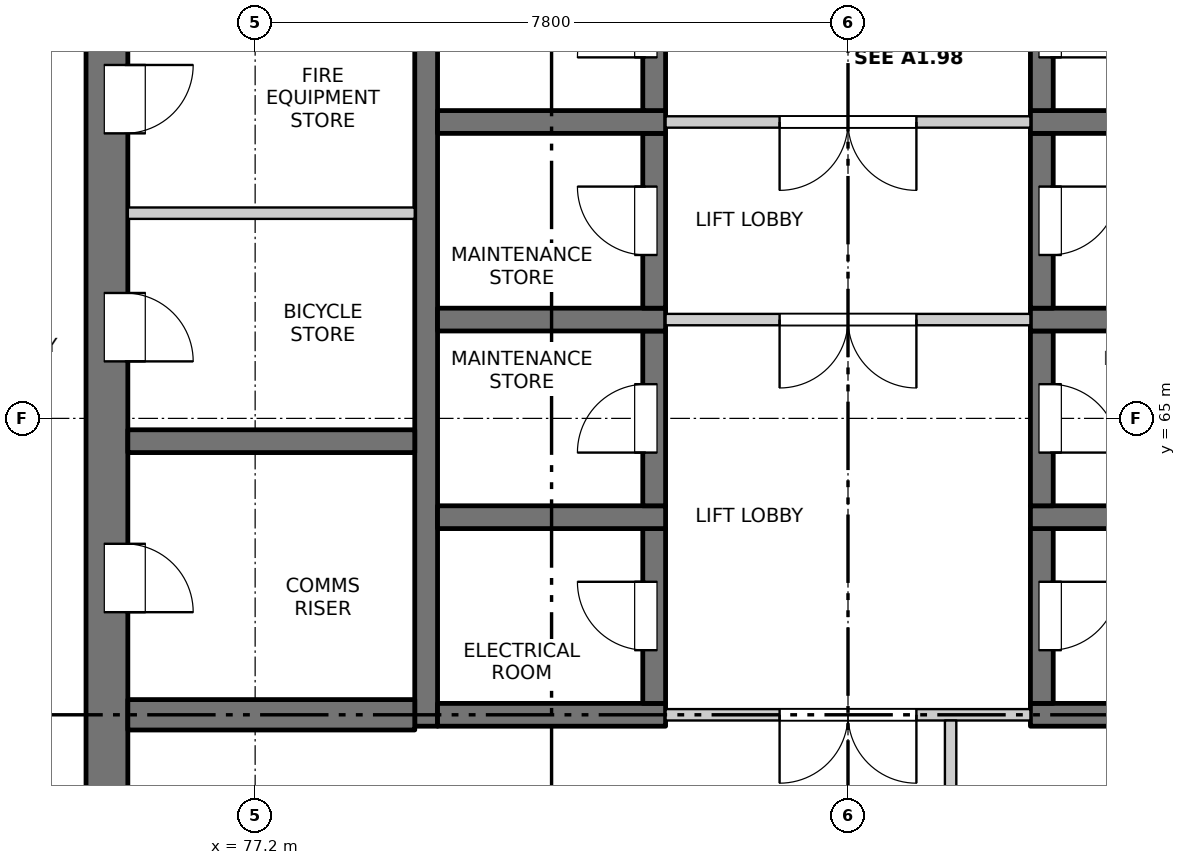
"""IFC4 building model, lengths in metres.
Left out: names, types, materials, properties, quantities, classifications, styles, units other than length and angle.
Written with IfcOpenShell. Run it as: python <this file> out.ifc"""

import sys

from ifc_helpers import new_model, si_unit, direction, frame, frame_2d, origin, place, context, subcontext, project, spatial, rectangle, extrude, element, fill, save


model = new_model("IFC4")
c1 = context("Model", 3, precision=1e-05, world=origin(), true_north=direction((0.0, 1.0)))
c2 = subcontext(c1, "Body", "Model", "MODEL_VIEW")
j1 = project(units=[si_unit("LENGTHUNIT", "METRE"), si_unit("PLANEANGLEUNIT", "RADIAN")], contexts=[c1])
p1 = place(None, origin())
s1 = spatial("IfcSite", under=j1, at=p1, CompositionType="ELEMENT")
p2 = place(p1, origin())
s2 = spatial("IfcBuilding", under=s1, at=p2, CompositionType="ELEMENT")
p3 = place(p2, frame((0.0, 0.0, 189.4)))
s3 = spatial("IfcBuildingStorey", under=s2, at=p3, CompositionType="ELEMENT", Elevation=189.4)
p4 = place(p3, frame((75.25, 54.975, -0.25), z_axis=(0.0, 0.0, 1.0), x_axis=(0.0, 1.0, 0.0)))
e1 = element("IfcWall", 1, at=p4, inside=s3, PredefinedType="SOLIDWALL", context=c2, shape_type="SweptSolid", body=[
    extrude(rectangle(XDim=22.325, YDim=0.55, at=frame_2d((11.163, 0.0))), origin(), (0.0, 0.0, 1.0), 3.35),
])
p5 = place(p4, frame((7.475, 0.0, 0.25)))
e2 = element("IfcOpeningElement", 2, at=p5, cuts=e1, PredefinedType="OPENING", context=c2, shape_type="SweptSolid", body=[
    extrude(rectangle(XDim=0.9, YDim=2.1, at=frame_2d((0.45, 1.05))), frame((0.0, 0.285, 0.0), z_axis=(0.0, -1.0, 0.0), x_axis=(1.0, 0.0, 0.0)), (0.0, 0.0, 1.0), 0.57),
])
p6 = place(p4, frame((10.775, 0.0, 0.25)))
e3 = element("IfcOpeningElement", 3, at=p6, cuts=e1, PredefinedType="OPENING", context=c2, shape_type="SweptSolid", body=[
    extrude(rectangle(XDim=0.9, YDim=2.1, at=frame_2d((0.45, 1.05))), frame((0.0, 0.285, 0.0), z_axis=(0.0, -1.0, 0.0), x_axis=(1.0, 0.0, 0.0)), (0.0, 0.0, 1.0), 0.57),
])
p7 = place(p4, frame((13.775, 0.0, 0.25)))
e4 = element("IfcOpeningElement", 4, at=p7, cuts=e1, PredefinedType="OPENING", context=c2, shape_type="SweptSolid", body=[
    extrude(rectangle(XDim=0.9, YDim=2.1, at=frame_2d((0.45, 1.05))), frame((0.0, 0.285, 0.0), z_axis=(0.0, -1.0, 0.0), x_axis=(1.0, 0.0, 0.0)), (0.0, 0.0, 1.0), 0.57),
])
p8 = place(p4, frame((16.775, 0.0, 0.25)))
e5 = element("IfcOpeningElement", 5, at=p8, cuts=e1, PredefinedType="OPENING", context=c2, shape_type="SweptSolid", body=[
    extrude(rectangle(XDim=0.9, YDim=2.1, at=frame_2d((0.45, 1.05))), frame((0.0, 0.285, 0.0), z_axis=(0.0, -1.0, 0.0), x_axis=(1.0, 0.0, 0.0)), (0.0, 0.0, 1.0), 0.57),
])
p9 = place(p4, frame((20.075, 0.0, 0.25)))
e6 = element("IfcOpeningElement", 6, at=p9, cuts=e1, PredefinedType="OPENING", context=c2, shape_type="SweptSolid", body=[
    extrude(rectangle(XDim=0.9, YDim=2.1, at=frame_2d((0.45, 1.05))), frame((0.0, 0.285, 0.0), z_axis=(0.0, -1.0, 0.0), x_axis=(1.0, 0.0, 0.0)), (0.0, 0.0, 1.0), 0.57),
])
p10 = place(p3, frame((79.45, 60.95, -0.25), z_axis=(0.0, 0.0, 1.0), x_axis=(0.0, 1.0, 0.0)))
e7 = element("IfcWall", 7, at=p10, inside=s3, PredefinedType="SOLIDWALL", context=c2, shape_type="SweptSolid", body=[
    extrude(rectangle(XDim=16.35, YDim=0.3, at=frame_2d((8.175, 0.0))), origin(), (0.0, 0.0, 1.0), 3.35),
])
p11 = place(p3, frame((79.6, 61.1, -0.25), z_axis=(0.0, 0.0, 1.0), x_axis=(1.0, 0.0, 0.0)))
e8 = element("IfcWall", 8, at=p11, inside=s3, PredefinedType="SOLIDWALL", context=c2, shape_type="SweptSolid", body=[
    extrude(rectangle(XDim=3.0, YDim=0.3, at=frame_2d((1.5, 0.0))), origin(), (0.0, 0.0, 1.0), 3.35),
])
p12 = place(p3, frame((82.45, 61.25, -0.25), z_axis=(0.0, 0.0, 1.0), x_axis=(0.0, 1.0, 0.0)))
e9 = element("IfcWall", 9, at=p12, inside=s3, PredefinedType="SOLIDWALL", context=c2, shape_type="SweptSolid", body=[
    extrude(rectangle(XDim=2.3, YDim=0.3, at=frame_2d((1.15, 0.0))), origin(), (0.0, 0.0, 1.0), 3.35),
])
p13 = place(p12, frame((0.7, 0.0, 0.25)))
e10 = element("IfcOpeningElement", 10, at=p13, cuts=e9, PredefinedType="OPENING", context=c2, shape_type="SweptSolid", body=[
    extrude(rectangle(XDim=0.9, YDim=2.1, at=frame_2d((0.45, 1.05))), frame((0.0, 0.16, 0.0), z_axis=(0.0, -1.0, 0.0), x_axis=(1.0, 0.0, 0.0)), (0.0, 0.0, 1.0), 0.32),
])
p14 = place(p3, frame((79.6, 63.7, -0.25), z_axis=(0.0, 0.0, 1.0), x_axis=(1.0, 0.0, 0.0)))
e11 = element("IfcWall", 11, at=p14, inside=s3, PredefinedType="SOLIDWALL", context=c2, shape_type="SweptSolid", body=[
    extrude(rectangle(XDim=3.0, YDim=0.3, at=frame_2d((1.5, 0.0))), origin(), (0.0, 0.0, 1.0), 3.35),
])
p15 = place(p3, frame((82.45, 63.85, -0.25), z_axis=(0.0, 0.0, 1.0), x_axis=(0.0, 1.0, 0.0)))
e12 = element("IfcWall", 12, at=p15, inside=s3, PredefinedType="SOLIDWALL", context=c2, shape_type="SweptSolid", body=[
    extrude(rectangle(XDim=2.3, YDim=0.3, at=frame_2d((1.15, 0.0))), origin(), (0.0, 0.0, 1.0), 3.35),
])
p16 = place(p15, frame((0.7, 0.0, 0.25)))
e13 = element("IfcOpeningElement", 13, at=p16, cuts=e12, PredefinedType="OPENING", context=c2, shape_type="SweptSolid", body=[
    extrude(rectangle(XDim=0.9, YDim=2.1, at=frame_2d((0.45, 1.05))), frame((0.0, 0.16, 0.0), z_axis=(0.0, -1.0, 0.0), x_axis=(1.0, 0.0, 0.0)), (0.0, 0.0, 1.0), 0.32),
])
p17 = place(p3, frame((79.6, 66.3, -0.25), z_axis=(0.0, 0.0, 1.0), x_axis=(1.0, 0.0, 0.0)))
e14 = element("IfcWall", 14, at=p17, inside=s3, PredefinedType="SOLIDWALL", context=c2, shape_type="SweptSolid", body=[
    extrude(rectangle(XDim=3.0, YDim=0.3, at=frame_2d((1.5, 0.0))), origin(), (0.0, 0.0, 1.0), 3.35),
])
p18 = place(p3, frame((82.45, 66.45, -0.25), z_axis=(0.0, 0.0, 1.0), x_axis=(0.0, 1.0, 0.0)))
e15 = element("IfcWall", 15, at=p18, inside=s3, PredefinedType="SOLIDWALL", context=c2, shape_type="SweptSolid", body=[
    extrude(rectangle(XDim=2.3, YDim=0.3, at=frame_2d((1.15, 0.0))), origin(), (0.0, 0.0, 1.0), 3.35),
])
p19 = place(p18, frame((0.7, 0.0, 0.25)))
e16 = element("IfcOpeningElement", 16, at=p19, cuts=e15, PredefinedType="OPENING", context=c2, shape_type="SweptSolid", body=[
    extrude(rectangle(XDim=0.9, YDim=2.1, at=frame_2d((0.45, 1.05))), frame((0.0, 0.16, 0.0), z_axis=(0.0, -1.0, 0.0), x_axis=(1.0, 0.0, 0.0)), (0.0, 0.0, 1.0), 0.32),
])
p20 = place(p3, frame((79.6, 68.9, -0.25), z_axis=(0.0, 0.0, 1.0), x_axis=(1.0, 0.0, 0.0)))
e17 = element("IfcWall", 17, at=p20, inside=s3, PredefinedType="SOLIDWALL", context=c2, shape_type="SweptSolid", body=[
    extrude(rectangle(XDim=3.0, YDim=0.3, at=frame_2d((1.5, 0.0))), origin(), (0.0, 0.0, 1.0), 3.35),
])
p21 = place(p3, frame((82.45, 69.05, -0.25), z_axis=(0.0, 0.0, 1.0), x_axis=(0.0, 1.0, 0.0)))
e18 = element("IfcWall", 18, at=p21, inside=s3, PredefinedType="SOLIDWALL", context=c2, shape_type="SweptSolid", body=[
    extrude(rectangle(XDim=2.3, YDim=0.3, at=frame_2d((1.15, 0.0))), origin(), (0.0, 0.0, 1.0), 3.35),
])
p22 = place(p21, frame((0.7, 0.0, 0.25)))
e19 = element("IfcOpeningElement", 19, at=p22, cuts=e18, PredefinedType="OPENING", context=c2, shape_type="SweptSolid", body=[
    extrude(rectangle(XDim=0.9, YDim=2.1, at=frame_2d((0.45, 1.05))), frame((0.0, 0.16, 0.0), z_axis=(0.0, -1.0, 0.0), x_axis=(1.0, 0.0, 0.0)), (0.0, 0.0, 1.0), 0.32),
])
p23 = place(p3, frame((87.4, 61.1, -0.25), z_axis=(0.0, 0.0, 1.0), x_axis=(1.0, 0.0, 0.0)))
e20 = element("IfcWall", 20, at=p23, inside=s3, PredefinedType="SOLIDWALL", context=c2, shape_type="SweptSolid", body=[
    extrude(rectangle(XDim=3.0, YDim=0.3, at=frame_2d((1.5, 0.0))), origin(), (0.0, 0.0, 1.0), 3.35),
])
p24 = place(p3, frame((87.55, 61.25, -0.25), z_axis=(0.0, 0.0, 1.0), x_axis=(0.0, 1.0, 0.0)))
e21 = element("IfcWall", 21, at=p24, inside=s3, PredefinedType="SOLIDWALL", context=c2, shape_type="SweptSolid", body=[
    extrude(rectangle(XDim=2.3, YDim=0.3, at=frame_2d((1.15, 0.0))), origin(), (0.0, 0.0, 1.0), 3.35),
])
p25 = place(p24, frame((0.7, 0.0, 0.25)))
e22 = element("IfcOpeningElement", 22, at=p25, cuts=e21, PredefinedType="OPENING", context=c2, shape_type="SweptSolid", body=[
    extrude(rectangle(XDim=0.9, YDim=2.1, at=frame_2d((0.45, 1.05))), frame((0.0, 0.16, 0.0), z_axis=(0.0, -1.0, 0.0), x_axis=(1.0, 0.0, 0.0)), (0.0, 0.0, 1.0), 0.32),
])
p26 = place(p3, frame((87.4, 63.7, -0.25), z_axis=(0.0, 0.0, 1.0), x_axis=(1.0, 0.0, 0.0)))
e23 = element("IfcWall", 23, at=p26, inside=s3, PredefinedType="SOLIDWALL", context=c2, shape_type="SweptSolid", body=[
    extrude(rectangle(XDim=3.0, YDim=0.3, at=frame_2d((1.5, 0.0))), origin(), (0.0, 0.0, 1.0), 3.35),
])
p27 = place(p3, frame((87.55, 63.85, -0.25), z_axis=(0.0, 0.0, 1.0), x_axis=(0.0, 1.0, 0.0)))
e24 = element("IfcWall", 24, at=p27, inside=s3, PredefinedType="SOLIDWALL", context=c2, shape_type="SweptSolid", body=[
    extrude(rectangle(XDim=2.3, YDim=0.3, at=frame_2d((1.15, 0.0))), origin(), (0.0, 0.0, 1.0), 3.35),
])
p28 = place(p27, frame((0.7, 0.0, 0.25)))
e25 = element("IfcOpeningElement", 25, at=p28, cuts=e24, PredefinedType="OPENING", context=c2, shape_type="SweptSolid", body=[
    extrude(rectangle(XDim=0.9, YDim=2.1, at=frame_2d((0.45, 1.05))), frame((0.0, 0.16, 0.0), z_axis=(0.0, -1.0, 0.0), x_axis=(1.0, 0.0, 0.0)), (0.0, 0.0, 1.0), 0.32),
])
p29 = place(p3, frame((87.4, 66.3, -0.25), z_axis=(0.0, 0.0, 1.0), x_axis=(1.0, 0.0, 0.0)))
e26 = element("IfcWall", 26, at=p29, inside=s3, PredefinedType="SOLIDWALL", context=c2, shape_type="SweptSolid", body=[
    extrude(rectangle(XDim=3.0, YDim=0.3, at=frame_2d((1.5, 0.0))), origin(), (0.0, 0.0, 1.0), 3.35),
])
p30 = place(p3, frame((87.55, 66.45, -0.25), z_axis=(0.0, 0.0, 1.0), x_axis=(0.0, 1.0, 0.0)))
e27 = element("IfcWall", 27, at=p30, inside=s3, PredefinedType="SOLIDWALL", context=c2, shape_type="SweptSolid", body=[
    extrude(rectangle(XDim=2.3, YDim=0.3, at=frame_2d((1.15, 0.0))), origin(), (0.0, 0.0, 1.0), 3.35),
])
p31 = place(p30, frame((0.7, 0.0, 0.25)))
e28 = element("IfcOpeningElement", 28, at=p31, cuts=e27, PredefinedType="OPENING", context=c2, shape_type="SweptSolid", body=[
    extrude(rectangle(XDim=0.9, YDim=2.1, at=frame_2d((0.45, 1.05))), frame((0.0, 0.16, 0.0), z_axis=(0.0, -1.0, 0.0), x_axis=(1.0, 0.0, 0.0)), (0.0, 0.0, 1.0), 0.32),
])
p32 = place(p3, frame((87.4, 68.9, -0.25), z_axis=(0.0, 0.0, 1.0), x_axis=(1.0, 0.0, 0.0)))
e29 = element("IfcWall", 29, at=p32, inside=s3, PredefinedType="SOLIDWALL", context=c2, shape_type="SweptSolid", body=[
    extrude(rectangle(XDim=3.0, YDim=0.3, at=frame_2d((1.5, 0.0))), origin(), (0.0, 0.0, 1.0), 3.35),
])
p33 = place(p3, frame((87.55, 69.05, -0.25), z_axis=(0.0, 0.0, 1.0), x_axis=(0.0, 1.0, 0.0)))
e30 = element("IfcWall", 30, at=p33, inside=s3, PredefinedType="SOLIDWALL", context=c2, shape_type="SweptSolid", body=[
    extrude(rectangle(XDim=2.3, YDim=0.3, at=frame_2d((1.15, 0.0))), origin(), (0.0, 0.0, 1.0), 3.35),
])
p34 = place(p33, frame((0.7, 0.0, 0.25)))
e31 = element("IfcOpeningElement", 31, at=p34, cuts=e30, PredefinedType="OPENING", context=c2, shape_type="SweptSolid", body=[
    extrude(rectangle(XDim=0.9, YDim=2.1, at=frame_2d((0.45, 1.05))), frame((0.0, 0.16, 0.0), z_axis=(0.0, -1.0, 0.0), x_axis=(1.0, 0.0, 0.0)), (0.0, 0.0, 1.0), 0.32),
])
p35 = place(p3, frame((75.525, 61.1, -0.25), z_axis=(0.0, 0.0, 1.0), x_axis=(1.0, 0.0, 0.0)))
e32 = element("IfcWall", 32, at=p35, inside=s3, PredefinedType="SOLIDWALL", context=c2, shape_type="SweptSolid", body=[
    extrude(rectangle(XDim=3.775, YDim=0.4, at=frame_2d((1.888, 0.0))), origin(), (0.0, 0.0, 1.0), 3.35),
])
p36 = place(p3, frame((75.525, 64.7, -0.25), z_axis=(0.0, 0.0, 1.0), x_axis=(1.0, 0.0, 0.0)))
e33 = element("IfcWall", 33, at=p36, inside=s3, PredefinedType="SOLIDWALL", context=c2, shape_type="SweptSolid", body=[
    extrude(rectangle(XDim=3.775, YDim=0.3, at=frame_2d((1.888, 0.0))), origin(), (0.0, 0.0, 1.0), 3.35),
])
p37 = place(p3, frame((82.6, 61.1, 0.0), z_axis=(0.0, 0.0, 1.0), x_axis=(1.0, 0.0, 0.0)))
e34 = element("IfcWall", 34, at=p37, inside=s3, PredefinedType="PARTITIONING", context=c2, shape_type="SweptSolid", body=[
    extrude(rectangle(XDim=4.8, YDim=0.15, at=frame_2d((2.4, 0.0))), origin(), (0.0, 0.0, 1.0), 3.1),
])
p38 = place(p37, frame((1.5, 0.0, 0.0)))
e35 = element("IfcOpeningElement", 35, at=p38, cuts=e34, PredefinedType="OPENING", context=c2, shape_type="SweptSolid", body=[
    extrude(rectangle(XDim=1.8, YDim=2.1, at=frame_2d((0.9, 1.05))), frame((0.0, 0.085, 0.0), z_axis=(0.0, -1.0, 0.0), x_axis=(1.0, 0.0, 0.0)), (0.0, 0.0, 1.0), 0.17),
])
p39 = place(p3, frame((82.6, 66.3, 0.0), z_axis=(0.0, 0.0, 1.0), x_axis=(1.0, 0.0, 0.0)))
e36 = element("IfcWall", 36, at=p39, inside=s3, PredefinedType="PARTITIONING", context=c2, shape_type="SweptSolid", body=[
    extrude(rectangle(XDim=4.8, YDim=0.15, at=frame_2d((2.4, 0.0))), origin(), (0.0, 0.0, 1.0), 3.1),
])
p40 = place(p39, frame((1.5, 0.0, 0.0)))
e37 = element("IfcOpeningElement", 37, at=p40, cuts=e36, PredefinedType="OPENING", context=c2, shape_type="SweptSolid", body=[
    extrude(rectangle(XDim=1.8, YDim=2.1, at=frame_2d((0.9, 1.05))), frame((0.0, 0.085, 0.0), z_axis=(0.0, -1.0, 0.0), x_axis=(1.0, 0.0, 0.0)), (0.0, 0.0, 1.0), 0.17),
])
p41 = place(p3, frame((75.525, 67.7, 0.0), z_axis=(0.0, 0.0, 1.0), x_axis=(1.0, 0.0, 0.0)))
e38 = element("IfcWall", 38, at=p41, inside=s3, PredefinedType="PARTITIONING", context=c2, shape_type="SweptSolid", body=[
    extrude(rectangle(XDim=3.775, YDim=0.15, at=frame_2d((1.887, 0.0))), origin(), (0.0, 0.0, 1.0), 3.1),
])
p42 = place(p3, frame((82.6, 68.9, 0.0), z_axis=(0.0, 0.0, 1.0), x_axis=(1.0, 0.0, 0.0)))
e39 = element("IfcWall", 39, at=p42, inside=s3, PredefinedType="PARTITIONING", context=c2, shape_type="SweptSolid", body=[
    extrude(rectangle(XDim=4.8, YDim=0.15, at=frame_2d((2.4, 0.0))), origin(), (0.0, 0.0, 1.0), 3.1),
])
p43 = place(p42, frame((1.5, 0.0, 0.0)))
e40 = element("IfcOpeningElement", 40, at=p43, cuts=e39, PredefinedType="OPENING", context=c2, shape_type="SweptSolid", body=[
    extrude(rectangle(XDim=1.8, YDim=2.1, at=frame_2d((0.9, 1.05))), frame((0.0, 0.085, 0.0), z_axis=(0.0, -1.0, 0.0), x_axis=(1.0, 0.0, 0.0)), (0.0, 0.0, 1.0), 0.17),
])
p44 = place(p3, frame((86.35, 55.525, 0.0), z_axis=(0.0, 0.0, 1.0), x_axis=(0.0, 1.0, 0.0)))
e41 = element("IfcWall", 41, at=p44, inside=s3, PredefinedType="PARTITIONING", context=c2, shape_type="SweptSolid", body=[
    extrude(rectangle(XDim=5.5, YDim=0.15, at=frame_2d((2.75, 0.0))), origin(), (0.0, 0.0, 1.0), 3.1),
])
p45 = place(p44, frame((2.175, 0.0, 0.0)))
e42 = element("IfcOpeningElement", 42, at=p45, cuts=e41, PredefinedType="OPENING", context=c2, shape_type="SweptSolid", body=[
    extrude(rectangle(XDim=0.9, YDim=2.1, at=frame_2d((0.45, 1.05))), frame((0.0, 0.085, 0.0), z_axis=(0.0, -1.0, 0.0), x_axis=(1.0, 0.0, 0.0)), (0.0, 0.0, 1.0), 0.17),
])
p46 = place(p38, origin())
e43 = element("IfcDoor", 43, at=p46, inside=s3, OperationType="DOUBLE_DOOR_SINGLE_SWING", PredefinedType="DOOR", context=c2, shape_type="SweptSolid", body=[
    extrude(rectangle(XDim=1.8, YDim=2.1, at=frame_2d((0.9, 1.05))), frame((0.0, 0.025, 0.0), z_axis=(0.0, -1.0, 0.0), x_axis=(1.0, 0.0, 0.0)), (0.0, 0.0, 1.0), 0.05),
])
fill(e35, e43)
p47 = place(p13, origin())
e44 = element("IfcDoor", 44, at=p47, inside=s3, OperationType="SINGLE_SWING_RIGHT", PredefinedType="DOOR", context=c2, shape_type="SweptSolid", body=[
    extrude(rectangle(XDim=0.9, YDim=2.1, at=frame_2d((0.45, 1.05))), frame((0.0, 0.135, 0.0), z_axis=(0.0, -1.0, 0.0), x_axis=(1.0, 0.0, 0.0)), (0.0, 0.0, 1.0), 0.05),
])
fill(e10, e44)
p48 = place(p25, origin())
e45 = element("IfcDoor", 45, at=p48, inside=s3, OperationType="SINGLE_SWING_LEFT", PredefinedType="DOOR", context=c2, shape_type="SweptSolid", body=[
    extrude(rectangle(XDim=0.9, YDim=2.1, at=frame_2d((0.45, 1.05))), frame((0.0, -0.085, 0.0), z_axis=(0.0, -1.0, 0.0), x_axis=(1.0, 0.0, 0.0)), (0.0, 0.0, 1.0), 0.05),
])
fill(e22, e45)
p49 = place(p5, origin())
e46 = element("IfcDoor", 46, at=p49, inside=s3, OperationType="SINGLE_SWING_RIGHT", PredefinedType="DOOR", context=c2, shape_type="SweptSolid", body=[
    extrude(rectangle(XDim=0.9, YDim=2.1, at=frame_2d((0.45, 1.05))), frame((0.0, -0.21, 0.0), z_axis=(0.0, -1.0, 0.0), x_axis=(1.0, 0.0, 0.0)), (0.0, 0.0, 1.0), 0.05),
])
fill(e2, e46)
p50 = place(p16, origin())
e47 = element("IfcDoor", 47, at=p50, inside=s3, OperationType="SINGLE_SWING_LEFT", PredefinedType="DOOR", context=c2, shape_type="SweptSolid", body=[
    extrude(rectangle(XDim=0.9, YDim=2.1, at=frame_2d((0.45, 1.05))), frame((0.0, 0.135, 0.0), z_axis=(0.0, -1.0, 0.0), x_axis=(1.0, 0.0, 0.0)), (0.0, 0.0, 1.0), 0.05),
])
fill(e13, e47)
p51 = place(p28, origin())
e48 = element("IfcDoor", 48, at=p51, inside=s3, OperationType="SINGLE_SWING_RIGHT", PredefinedType="DOOR", context=c2, shape_type="SweptSolid", body=[
    extrude(rectangle(XDim=0.9, YDim=2.1, at=frame_2d((0.45, 1.05))), frame((0.0, -0.085, 0.0), z_axis=(0.0, -1.0, 0.0), x_axis=(1.0, 0.0, 0.0)), (0.0, 0.0, 1.0), 0.05),
])
fill(e25, e48)
p52 = place(p6, origin())
e49 = element("IfcDoor", 49, at=p52, inside=s3, OperationType="SINGLE_SWING_RIGHT", PredefinedType="DOOR", context=c2, shape_type="SweptSolid", body=[
    extrude(rectangle(XDim=0.9, YDim=2.1, at=frame_2d((0.45, 1.05))), frame((0.0, -0.21, 0.0), z_axis=(0.0, -1.0, 0.0), x_axis=(1.0, 0.0, 0.0)), (0.0, 0.0, 1.0), 0.05),
])
fill(e3, e49)
p53 = place(p40, origin())
e50 = element("IfcDoor", 50, at=p53, inside=s3, OperationType="DOUBLE_DOOR_SINGLE_SWING", PredefinedType="DOOR", context=c2, shape_type="SweptSolid", body=[
    extrude(rectangle(XDim=1.8, YDim=2.1, at=frame_2d((0.9, 1.05))), frame((0.0, 0.025, 0.0), z_axis=(0.0, -1.0, 0.0), x_axis=(1.0, 0.0, 0.0)), (0.0, 0.0, 1.0), 0.05),
])
fill(e37, e50)
p54 = place(p19, origin())
e51 = element("IfcDoor", 51, at=p54, inside=s3, OperationType="SINGLE_SWING_RIGHT", PredefinedType="DOOR", context=c2, shape_type="SweptSolid", body=[
    extrude(rectangle(XDim=0.9, YDim=2.1, at=frame_2d((0.45, 1.05))), frame((0.0, 0.135, 0.0), z_axis=(0.0, -1.0, 0.0), x_axis=(1.0, 0.0, 0.0)), (0.0, 0.0, 1.0), 0.05),
])
fill(e16, e51)
p55 = place(p31, origin())
e52 = element("IfcDoor", 52, at=p55, inside=s3, OperationType="SINGLE_SWING_LEFT", PredefinedType="DOOR", context=c2, shape_type="SweptSolid", body=[
    extrude(rectangle(XDim=0.9, YDim=2.1, at=frame_2d((0.45, 1.05))), frame((0.0, -0.085, 0.0), z_axis=(0.0, -1.0, 0.0), x_axis=(1.0, 0.0, 0.0)), (0.0, 0.0, 1.0), 0.05),
])
fill(e28, e52)
p56 = place(p43, origin())
e53 = element("IfcDoor", 53, at=p56, inside=s3, OperationType="DOUBLE_DOOR_SINGLE_SWING", PredefinedType="DOOR", context=c2, shape_type="SweptSolid", body=[
    extrude(rectangle(XDim=1.8, YDim=2.1, at=frame_2d((0.9, 1.05))), frame((0.0, 0.025, 0.0), z_axis=(0.0, -1.0, 0.0), x_axis=(1.0, 0.0, 0.0)), (0.0, 0.0, 1.0), 0.05),
])
fill(e40, e53)
p57 = place(p7, origin())
e54 = element("IfcDoor", 54, at=p57, inside=s3, OperationType="SINGLE_SWING_LEFT", PredefinedType="DOOR", context=c2, shape_type="SweptSolid", body=[
    extrude(rectangle(XDim=0.9, YDim=2.1, at=frame_2d((0.45, 1.05))), frame((0.0, -0.21, 0.0), z_axis=(0.0, -1.0, 0.0), x_axis=(1.0, 0.0, 0.0)), (0.0, 0.0, 1.0), 0.05),
])
fill(e4, e54)
p58 = place(p22, origin())
e55 = element("IfcDoor", 55, at=p58, inside=s3, OperationType="SINGLE_SWING_LEFT", PredefinedType="DOOR", context=c2, shape_type="SweptSolid", body=[
    extrude(rectangle(XDim=0.9, YDim=2.1, at=frame_2d((0.45, 1.05))), frame((0.0, 0.135, 0.0), z_axis=(0.0, -1.0, 0.0), x_axis=(1.0, 0.0, 0.0)), (0.0, 0.0, 1.0), 0.05),
])
fill(e19, e55)
p59 = place(p34, origin())
e56 = element("IfcDoor", 56, at=p59, inside=s3, OperationType="SINGLE_SWING_RIGHT", PredefinedType="DOOR", context=c2, shape_type="SweptSolid", body=[
    extrude(rectangle(XDim=0.9, YDim=2.1, at=frame_2d((0.45, 1.05))), frame((0.0, -0.085, 0.0), z_axis=(0.0, -1.0, 0.0), x_axis=(1.0, 0.0, 0.0)), (0.0, 0.0, 1.0), 0.05),
])
fill(e31, e56)
save(model, sys.argv[1])
